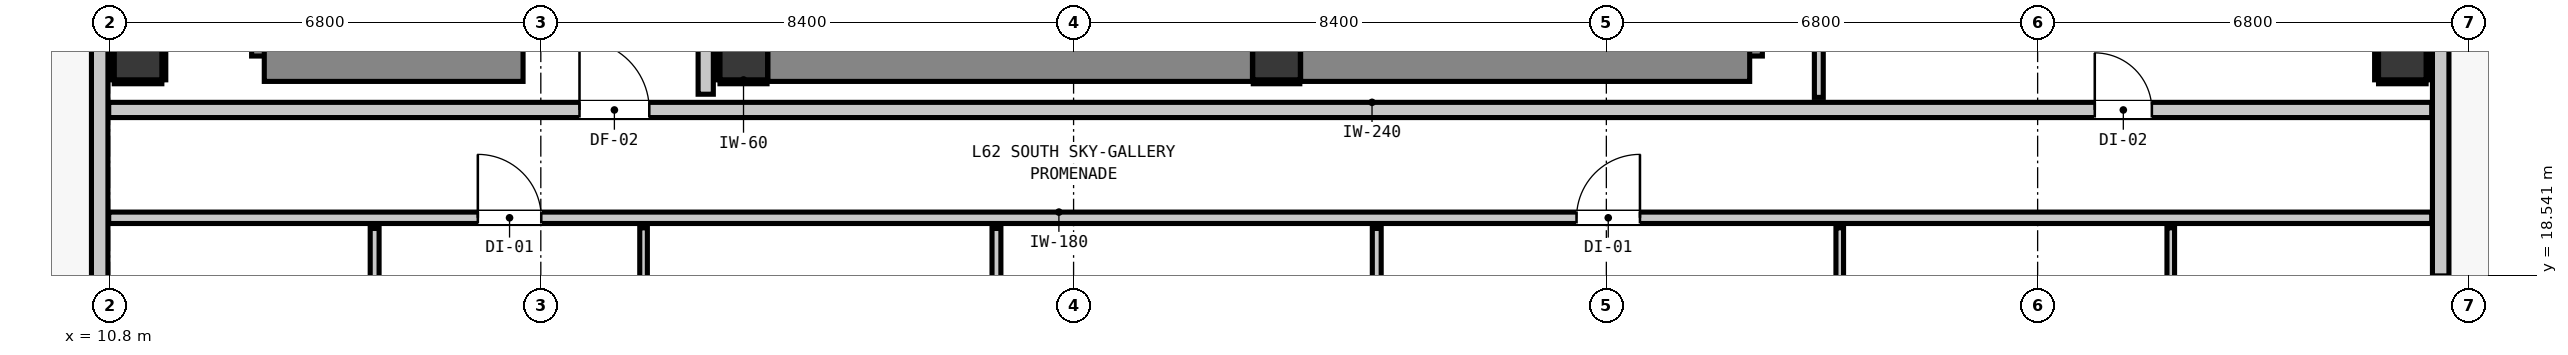
"""IFC4 building model, lengths in metres.
Left out: names, types, materials, properties, quantities, classifications, styles, units other than length and angle.
Written with IfcOpenShell. Run it as: python <this file> out.ifc"""

import sys

from ifc_helpers import new_model, si_unit, direction, frame, frame_2d, origin, origin_2d, place, context, subcontext, project, spatial, rectangle, extrude, element, fill, save


model = new_model("IFC4")
c1 = context("Model", 3, precision=1e-05, world=origin(), true_north=direction((0.0, 1.0)))
c2 = subcontext(c1, "Body", "Model", "MODEL_VIEW")
j1 = project(units=[si_unit("LENGTHUNIT", "METRE"), si_unit("PLANEANGLEUNIT", "RADIAN")], contexts=[c1])
p1 = place(None, origin())
s1 = spatial("IfcSite", under=j1, at=p1, CompositionType="ELEMENT")
p2 = place(p1, origin())
s2 = spatial("IfcBuilding", under=s1, at=p2, CompositionType="ELEMENT")
p3 = place(p2, frame((0.0, 0.0, 213.4)))
s3 = spatial("IfcBuildingStorey", under=s2, at=p3, CompositionType="ELEMENT", Elevation=213.4)
for number, where, z_axis, x_axis in (
    (1, (20.8, 22.0, 0.0), (0.0, 0.0, 1.0), (1.0, 0.0, 0.0)),
    (2, (29.2, 22.0, 0.0), (0.0, 0.0, 1.0), (1.0, 0.0, 0.0)),
):
    element("IfcColumn", number, at=place(p3, frame(where, z_axis=z_axis, x_axis=x_axis)), inside=s3, PredefinedType="COLUMN", context=c2, shape_type="SweptSolid", body=[
        extrude(rectangle(XDim=0.75, YDim=0.75, at=origin_2d()), origin(), (0.0, 0.0, 1.0), 3.32),
    ])
p4 = place(p3, frame((13.44, 22.0, 0.0), z_axis=(0.0, 0.0, 1.0), x_axis=(0.0, 1.0, 0.0)))
e3 = element("IfcWall", 3, at=p4, inside=s3, PredefinedType="SHEAR", context=c2, shape_type="SweptSolid", body=[
    extrude(rectangle(XDim=8.32, YDim=0.8, at=frame_2d((4.16, 0.0))), origin(), (0.0, 0.0, 1.0), 3.32),
])
p5 = place(p3, frame((13.24, 22.0, 0.0), z_axis=(0.0, 0.0, 1.0), x_axis=(1.0, 0.0, 0.0)))
e4 = element("IfcWall", 4, at=p5, inside=s3, PredefinedType="SHEAR", context=c2, shape_type="SweptSolid", body=[
    extrude(rectangle(XDim=4.08, YDim=0.8, at=frame_2d((2.04, 0.0))), origin(), (0.0, 0.0, 1.0), 3.32),
])
p6 = place(p3, frame((36.46, 22.0, 0.0), z_axis=(0.0, 0.0, 1.0), x_axis=(0.0, 1.0, 0.0)))
e5 = element("IfcWall", 5, at=p6, inside=s3, PredefinedType="SHEAR", context=c2, shape_type="SweptSolid", body=[
    extrude(rectangle(XDim=8.32, YDim=0.8, at=frame_2d((4.16, 0.0))), origin(), (0.0, 0.0, 1.0), 3.32),
])
p7 = place(p3, frame((29.58, 22.0, 0.0), z_axis=(0.0, 0.0, 1.0), x_axis=(1.0, 0.0, 0.0)))
e6 = element("IfcWall", 6, at=p7, inside=s3, PredefinedType="SHEAR", context=c2, shape_type="SweptSolid", body=[
    extrude(rectangle(XDim=7.08, YDim=0.8, at=frame_2d((3.54, 0.0))), origin(), (0.0, 0.0, 1.0), 3.32),
])
p8 = place(p3, frame((21.18, 22.0, 0.0), z_axis=(0.0, 0.0, 1.0), x_axis=(1.0, 0.0, 0.0)))
e7 = element("IfcWall", 7, at=p8, inside=s3, PredefinedType="SHEAR", context=c2, shape_type="SweptSolid", body=[
    extrude(rectangle(XDim=7.64, YDim=0.8, at=frame_2d((3.82, 0.0))), origin(), (0.0, 0.0, 1.0), 3.32),
])
for number, where, z_axis, x_axis in (
    (8, (11.25, 22.0, 0.0), (0.0, 0.0, 1.0), (1.0, 0.0, 0.0)),
    (9, (46.95, 22.0, 0.0), (0.0, 0.0, 1.0), (1.0, 0.0, 0.0)),
):
    element("IfcColumn", number, at=place(p3, frame(where, z_axis=z_axis, x_axis=x_axis)), inside=s3, PredefinedType="COLUMN", context=c2, shape_type="SweptSolid", body=[
        extrude(rectangle(XDim=0.75, YDim=0.75, at=origin_2d()), origin(), (0.0, 0.0, 1.0), 3.32),
    ])
p9 = place(p3, frame((10.645, 12.345, 0.0), z_axis=(0.0, 0.0, 1.0), x_axis=(0.0, 1.0, 0.0)))
e10 = element("IfcWall", 10, at=p9, inside=s3, PredefinedType="STANDARD", context=c2, shape_type="SweptSolid", body=[
    extrude(rectangle(XDim=30.31, YDim=0.26, at=frame_2d((15.155, 0.0))), origin(), (0.0, 0.0, 1.0), 3.1),
])
p10 = place(p9, frame((0.91, 0.0, 0.0)))
e11 = element("IfcOpeningElement", 11, at=p10, cuts=e10, PredefinedType="OPENING", context=c2, shape_type="SweptSolid", body=[
    extrude(rectangle(XDim=1.0, YDim=2.15, at=frame_2d((0.5, 1.075))), frame((0.0, 0.14, 0.0), z_axis=(0.0, -1.0, 0.0), x_axis=(1.0, 0.0, 0.0)), (0.0, 0.0, 1.0), 0.28),
])
p11 = place(p9, frame((2.322, 0.0, 0.85)))
e12 = element("IfcOpeningElement", 12, at=p11, cuts=e10, PredefinedType="OPENING", context=c2, shape_type="SweptSolid", body=[
    extrude(rectangle(XDim=0.58, YDim=1.5, at=frame_2d((0.29, 0.75))), frame((0.0, 0.14, 0.0), z_axis=(0.0, -1.0, 0.0), x_axis=(1.0, 0.0, 0.0)), (0.0, 0.0, 1.0), 0.28),
])
p12 = place(p3, frame((47.555, 42.655, 0.0), z_axis=(0.0, 0.0, 1.0), x_axis=(0.0, -1.0, 0.0)))
e13 = element("IfcWall", 13, at=p12, inside=s3, PredefinedType="STANDARD", context=c2, shape_type="SweptSolid", body=[
    extrude(rectangle(XDim=30.31, YDim=0.26, at=frame_2d((15.155, 0.0))), origin(), (0.0, 0.0, 1.0), 3.1),
])
p13 = place(p12, frame((4.082, 0.0, 0.0)))
e14 = element("IfcOpeningElement", 14, at=p13, cuts=e13, PredefinedType="OPENING", context=c2, shape_type="SweptSolid", body=[
    extrude(rectangle(XDim=1.0, YDim=2.15, at=frame_2d((0.5, 1.075))), frame((0.0, 0.14, 0.0), z_axis=(0.0, -1.0, 0.0), x_axis=(1.0, 0.0, 0.0)), (0.0, 0.0, 1.0), 0.28),
])
p14 = place(p12, frame((24.101, 0.0, 0.85)))
e15 = element("IfcOpeningElement", 15, at=p14, cuts=e13, PredefinedType="OPENING", context=c2, shape_type="SweptSolid", body=[
    extrude(rectangle(XDim=2.1, YDim=1.9, at=frame_2d((1.05, 0.95))), frame((0.0, 0.14, 0.0), z_axis=(0.0, -1.0, 0.0), x_axis=(1.0, 0.0, 0.0)), (0.0, 0.0, 1.0), 0.28),
])
p15 = place(p12, frame((27.658, 0.0, 0.85)))
e16 = element("IfcOpeningElement", 16, at=p15, cuts=e13, PredefinedType="OPENING", context=c2, shape_type="SweptSolid", body=[
    extrude(rectangle(XDim=2.1, YDim=1.9, at=frame_2d((1.05, 0.95))), frame((0.0, 0.14, 0.0), z_axis=(0.0, -1.0, 0.0), x_axis=(1.0, 0.0, 0.0)), (0.0, 0.0, 1.0), 0.28),
])
p16 = place(p12, frame((15.255, 0.0, 0.85)))
e17 = element("IfcOpeningElement", 17, at=p16, cuts=e13, PredefinedType="OPENING", context=c2, shape_type="SweptSolid", body=[
    extrude(rectangle(XDim=2.1, YDim=1.9, at=frame_2d((1.05, 0.95))), frame((0.0, 0.14, 0.0), z_axis=(0.0, -1.0, 0.0), x_axis=(1.0, 0.0, 0.0)), (0.0, 0.0, 1.0), 0.28),
])
p17 = place(p3, frame((10.787, 21.15, 0.0), z_axis=(0.0, 0.0, 1.0), x_axis=(1.0, 0.0, 0.0)))
e18 = element("IfcWall", 18, at=p17, inside=s3, PredefinedType="PARTITIONING", context=c2, shape_type="SweptSolid", body=[
    extrude(rectangle(XDim=36.626, YDim=0.24, at=frame_2d((18.313, 0.0))), origin(), (0.0, 0.0, 1.0), 3.1),
])
p18 = place(p17, frame((7.423, 0.0, 0.0)))
e19 = element("IfcOpeningElement", 19, at=p18, cuts=e18, PredefinedType="OPENING", context=c2, shape_type="SweptSolid", body=[
    extrude(rectangle(XDim=1.1, YDim=2.15, at=frame_2d((0.55, 1.075))), frame((0.0, 0.13, 0.0), z_axis=(0.0, -1.0, 0.0), x_axis=(1.0, 0.0, 0.0)), (0.0, 0.0, 1.0), 0.26),
])
p19 = place(p17, frame((31.314, 0.0, 0.0)))
e20 = element("IfcOpeningElement", 20, at=p19, cuts=e18, PredefinedType="OPENING", context=c2, shape_type="SweptSolid", body=[
    extrude(rectangle(XDim=0.9, YDim=2.1, at=frame_2d((0.45, 1.05))), frame((0.0, 0.13, 0.0), z_axis=(0.0, -1.0, 0.0), x_axis=(1.0, 0.0, 0.0)), (0.0, 0.0, 1.0), 0.26),
])
p20 = place(p3, frame((10.787, 19.45, 0.0), z_axis=(0.0, 0.0, 1.0), x_axis=(1.0, 0.0, 0.0)))
e21 = element("IfcWall", 21, at=p20, inside=s3, PredefinedType="PARTITIONING", context=c2, shape_type="SweptSolid", body=[
    extrude(rectangle(XDim=36.626, YDim=0.18, at=frame_2d((18.313, 0.0))), origin(), (0.0, 0.0, 1.0), 3.1),
])
p21 = place(p20, frame((5.82, 0.0, 0.0)))
e22 = element("IfcOpeningElement", 22, at=p21, cuts=e21, PredefinedType="OPENING", context=c2, shape_type="SweptSolid", body=[
    extrude(rectangle(XDim=1.0, YDim=2.15, at=frame_2d((0.5, 1.075))), frame((0.0, 0.1, 0.0), z_axis=(0.0, -1.0, 0.0), x_axis=(1.0, 0.0, 0.0)), (0.0, 0.0, 1.0), 0.2),
])
p22 = place(p20, frame((23.143, 0.0, 0.0)))
e23 = element("IfcOpeningElement", 23, at=p22, cuts=e21, PredefinedType="OPENING", context=c2, shape_type="SweptSolid", body=[
    extrude(rectangle(XDim=1.0, YDim=2.15, at=frame_2d((0.5, 1.075))), frame((0.0, 0.1, 0.0), z_axis=(0.0, -1.0, 0.0), x_axis=(1.0, 0.0, 0.0)), (0.0, 0.0, 1.0), 0.2),
])
p23 = place(p3, frame((20.2, 21.398, 0.0), z_axis=(0.0, 0.0, 1.0), x_axis=(0.0, 1.0, 0.0)))
e24 = element("IfcWall", 24, at=p23, inside=s3, PredefinedType="PARTITIONING", context=c2, shape_type="SweptSolid", body=[
    extrude(rectangle(XDim=6.754, YDim=0.24, at=frame_2d((3.377, 0.0))), origin(), (0.0, 0.0, 1.0), 3.1),
])
p24 = place(p3, frame((14.98, 15.707, 0.0), z_axis=(0.0, 0.0, 1.0), x_axis=(0.0, 1.0, 0.0)))
e25 = element("IfcWall", 25, at=p24, inside=s3, PredefinedType="PARTITIONING", context=c2, shape_type="SweptSolid", body=[
    extrude(rectangle(XDim=3.575, YDim=0.14, at=frame_2d((1.788, 0.0))), origin(), (0.0, 0.0, 1.0), 3.1),
])
p25 = place(p24, frame((1.355, 0.0, 0.0)))
e26 = element("IfcOpeningElement", 26, at=p25, cuts=e25, PredefinedType="OPENING", context=c2, shape_type="SweptSolid", body=[
    extrude(rectangle(XDim=0.86, YDim=2.02, at=frame_2d((0.43, 1.01))), frame((0.0, 0.08, 0.0), z_axis=(0.0, -1.0, 0.0), x_axis=(1.0, 0.0, 0.0)), (0.0, 0.0, 1.0), 0.16),
])
p26 = place(p3, frame((24.784, 15.707, 0.0), z_axis=(0.0, 0.0, 1.0), x_axis=(0.0, 1.0, 0.0)))
e27 = element("IfcWall", 27, at=p26, inside=s3, PredefinedType="PARTITIONING", context=c2, shape_type="SweptSolid", body=[
    extrude(rectangle(XDim=3.575, YDim=0.14, at=frame_2d((1.788, 0.0))), origin(), (0.0, 0.0, 1.0), 3.1),
])
p27 = place(p3, frame((30.78, 15.707, 0.0), z_axis=(0.0, 0.0, 1.0), x_axis=(0.0, 1.0, 0.0)))
e28 = element("IfcWall", 28, at=p27, inside=s3, PredefinedType="PARTITIONING", context=c2, shape_type="SweptSolid", body=[
    extrude(rectangle(XDim=3.575, YDim=0.14, at=frame_2d((1.788, 0.0))), origin(), (0.0, 0.0, 1.0), 3.1),
])
p28 = place(p27, frame((1.355, 0.0, 0.0)))
e29 = element("IfcOpeningElement", 29, at=p28, cuts=e28, PredefinedType="OPENING", context=c2, shape_type="SweptSolid", body=[
    extrude(rectangle(XDim=0.86, YDim=2.02, at=frame_2d((0.43, 1.01))), frame((0.0, 0.08, 0.0), z_axis=(0.0, -1.0, 0.0), x_axis=(1.0, 0.0, 0.0)), (0.0, 0.0, 1.0), 0.16),
])
p29 = place(p3, frame((37.75, 21.348, 0.0), z_axis=(0.0, 0.0, 1.0), x_axis=(0.0, 1.0, 0.0)))
e30 = element("IfcWall", 30, at=p29, inside=s3, PredefinedType="PARTITIONING", context=c2, shape_type="SweptSolid", body=[
    extrude(rectangle(XDim=10.134, YDim=0.14, at=frame_2d((5.067, 0.0))), origin(), (0.0, 0.0, 1.0), 3.1),
])
p30 = place(p3, frame((19.22, 15.697, 0.0), z_axis=(0.0, 0.0, 1.0), x_axis=(0.0, 1.0, 0.0)))
e31 = element("IfcWall", 31, at=p30, inside=s3, PredefinedType="PARTITIONING", context=c2, shape_type="SweptSolid", body=[
    extrude(rectangle(XDim=3.595, YDim=0.12, at=frame_2d((1.797, 0.0))), origin(), (0.0, 0.0, 1.0), 3.1),
])
p31 = place(p30, frame((1.345, 0.0, 0.0)))
e32 = element("IfcOpeningElement", 32, at=p31, cuts=e31, PredefinedType="OPENING", context=c2, shape_type="SweptSolid", body=[
    extrude(rectangle(XDim=0.9, YDim=2.1, at=frame_2d((0.45, 1.05))), frame((0.0, 0.07, 0.0), z_axis=(0.0, -1.0, 0.0), x_axis=(1.0, 0.0, 0.0)), (0.0, 0.0, 1.0), 0.14),
])
p32 = place(p3, frame((38.08, 15.697, 0.0), z_axis=(0.0, 0.0, 1.0), x_axis=(0.0, 1.0, 0.0)))
e33 = element("IfcWall", 33, at=p32, inside=s3, PredefinedType="PARTITIONING", context=c2, shape_type="SweptSolid", body=[
    extrude(rectangle(XDim=3.595, YDim=0.12, at=frame_2d((1.797, 0.0))), origin(), (0.0, 0.0, 1.0), 3.1),
])
p33 = place(p32, frame((1.345, 0.0, 0.0)))
e34 = element("IfcOpeningElement", 34, at=p33, cuts=e33, PredefinedType="OPENING", context=c2, shape_type="SweptSolid", body=[
    extrude(rectangle(XDim=0.9, YDim=2.1, at=frame_2d((0.45, 1.05))), frame((0.0, 0.07, 0.0), z_axis=(0.0, -1.0, 0.0), x_axis=(1.0, 0.0, 0.0)), (0.0, 0.0, 1.0), 0.14),
])
p34 = place(p3, frame((43.299, 15.697, 0.0), z_axis=(0.0, 0.0, 1.0), x_axis=(0.0, 1.0, 0.0)))
e35 = element("IfcWall", 35, at=p34, inside=s3, PredefinedType="PARTITIONING", context=c2, shape_type="SweptSolid", body=[
    extrude(rectangle(XDim=3.595, YDim=0.12, at=frame_2d((1.797, 0.0))), origin(), (0.0, 0.0, 1.0), 3.1),
])
p35 = place(p34, frame((1.358, 0.0, 0.0)))
e36 = element("IfcOpeningElement", 36, at=p35, cuts=e35, PredefinedType="OPENING", context=c2, shape_type="SweptSolid", body=[
    extrude(rectangle(XDim=0.9, YDim=2.1, at=frame_2d((0.45, 1.05))), frame((0.0, 0.07, 0.0), z_axis=(0.0, -1.0, 0.0), x_axis=(1.0, 0.0, 0.0)), (0.0, 0.0, 1.0), 0.14),
])
p36 = place(p3, frame((20.425, 21.593, 0.0), z_axis=(0.0, 0.0, 1.0), x_axis=(1.0, 0.0, 0.0)))
e37 = element("IfcWall", 37, at=p36, inside=s3, PredefinedType="PARTITIONING", context=c2, shape_type="SweptSolid", body=[
    extrude(rectangle(XDim=0.742, YDim=0.06, at=frame_2d((0.371, 0.0))), origin(), (0.0, 0.0, 1.0), 1.45),
])
p37 = place(p3, frame((20.393, 21.625, 0.0), z_axis=(0.0, 0.0, 1.0), x_axis=(0.0, 1.0, 0.0)))
e38 = element("IfcWall", 38, at=p37, inside=s3, PredefinedType="PARTITIONING", context=c2, shape_type="SweptSolid", body=[
    extrude(rectangle(XDim=0.75, YDim=0.06, at=frame_2d((0.375, 0.0))), origin(), (0.0, 0.0, 1.0), 1.45),
])
p38 = place(p3, frame((28.833, 21.593, 0.0), z_axis=(0.0, 0.0, 1.0), x_axis=(1.0, 0.0, 0.0)))
e39 = element("IfcWall", 39, at=p38, inside=s3, PredefinedType="PARTITIONING", context=c2, shape_type="SweptSolid", body=[
    extrude(rectangle(XDim=0.734, YDim=0.06, at=frame_2d((0.367, 0.0))), origin(), (0.0, 0.0, 1.0), 1.45),
])
for number, where, z_axis, x_axis in (
    (40, (10.875, 21.593, 0.0), (0.0, 0.0, 1.0), (1.0, 0.0, 0.0)),
    (41, (10.843, 21.625, 0.0), (0.0, 0.0, 1.0), (0.0, 1.0, 0.0)),
    (42, (11.657, 21.625, 0.0), (0.0, 0.0, 1.0), (0.0, 1.0, 0.0)),
    (43, (46.575, 21.593, 0.0), (0.0, 0.0, 1.0), (1.0, 0.0, 0.0)),
    (44, (46.543, 21.625, 0.0), (0.0, 0.0, 1.0), (0.0, 1.0, 0.0)),
    (45, (47.357, 21.625, 0.0), (0.0, 0.0, 1.0), (0.0, 1.0, 0.0)),
):
    element("IfcWall", number, at=place(p3, frame(where, z_axis=z_axis, x_axis=x_axis)), inside=s3, PredefinedType="PARTITIONING", context=c2, shape_type="SweptSolid", body=[
        extrude(rectangle(XDim=0.75, YDim=0.06, at=frame_2d((0.375, 0.0))), origin(), (0.0, 0.0, 1.0), 1.45),
    ])
p39 = place(p14, origin())
e46 = element("IfcWindow", 46, at=p39, inside=s3, PartitioningType="SINGLE_PANEL", PredefinedType="WINDOW", context=c2, shape_type="SweptSolid", body=[
    extrude(rectangle(XDim=2.1, YDim=1.9, at=frame_2d((1.05, 0.95))), frame((0.0, 0.03, 0.0), z_axis=(0.0, -1.0, 0.0), x_axis=(1.0, 0.0, 0.0)), (0.0, 0.0, 1.0), 0.06),
])
fill(e15, e46)
p40 = place(p18, origin())
e47 = element("IfcDoor", 47, at=p40, inside=s3, OperationType="SINGLE_SWING_LEFT", PredefinedType="DOOR", context=c2, shape_type="SweptSolid", body=[
    extrude(rectangle(XDim=1.1, YDim=2.15, at=frame_2d((0.55, 1.075))), frame((0.0, 0.025, 0.0), z_axis=(0.0, -1.0, 0.0), x_axis=(1.0, 0.0, 0.0)), (0.0, 0.0, 1.0), 0.05),
])
fill(e19, e47)
p41 = place(p21, origin())
e48 = element("IfcDoor", 48, at=p41, inside=s3, OperationType="SINGLE_SWING_LEFT", PredefinedType="DOOR", context=c2, shape_type="SweptSolid", body=[
    extrude(rectangle(XDim=1.0, YDim=2.15, at=frame_2d((0.5, 1.075))), frame((0.0, 0.025, 0.0), z_axis=(0.0, -1.0, 0.0), x_axis=(1.0, 0.0, 0.0)), (0.0, 0.0, 1.0), 0.05),
])
fill(e22, e48)
p42 = place(p22, origin())
e49 = element("IfcDoor", 49, at=p42, inside=s3, OperationType="SINGLE_SWING_RIGHT", PredefinedType="DOOR", context=c2, shape_type="SweptSolid", body=[
    extrude(rectangle(XDim=1.0, YDim=2.15, at=frame_2d((0.5, 1.075))), frame((0.0, 0.025, 0.0), z_axis=(0.0, -1.0, 0.0), x_axis=(1.0, 0.0, 0.0)), (0.0, 0.0, 1.0), 0.05),
])
fill(e23, e49)
p43 = place(p19, origin())
e50 = element("IfcDoor", 50, at=p43, inside=s3, OperationType="SINGLE_SWING_LEFT", PredefinedType="DOOR", context=c2, shape_type="SweptSolid", body=[
    extrude(rectangle(XDim=0.9, YDim=2.1, at=frame_2d((0.45, 1.05))), frame((0.0, 0.025, 0.0), z_axis=(0.0, -1.0, 0.0), x_axis=(1.0, 0.0, 0.0)), (0.0, 0.0, 1.0), 0.05),
])
fill(e20, e50)
save(model, sys.argv[1])
